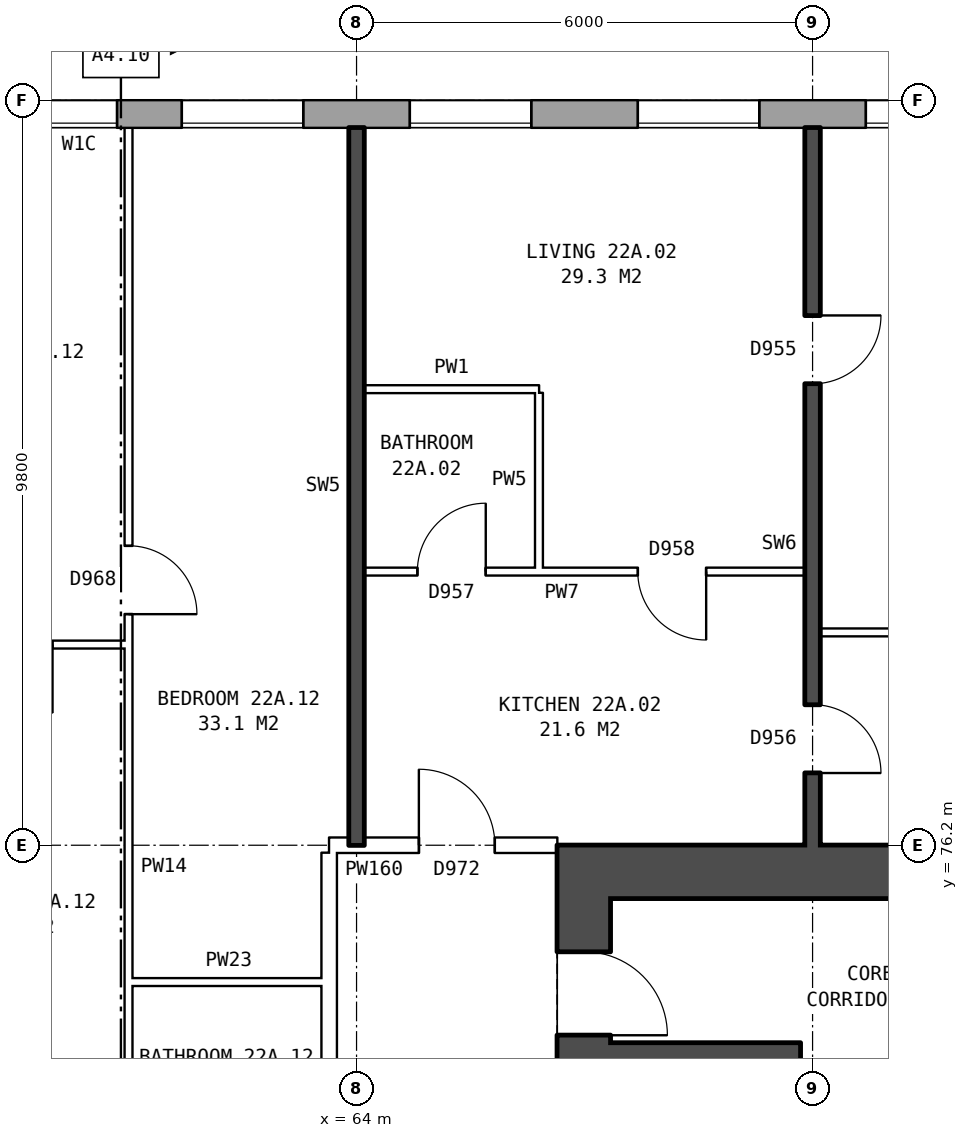
"""IFC4 building model, lengths in metres.
Left out: names, types, materials, properties, quantities, classifications, styles, units other than length and angle.
Written with IfcOpenShell. Run it as: python <this file> out.ifc"""

import sys

from ifc_helpers import new_model, si_unit, direction, frame, frame_2d, origin, place, context, subcontext, project, spatial, rectangle, extrude, element, fill, save


model = new_model("IFC4")
c1 = context("Model", 3, precision=1e-05, world=origin(), true_north=direction((0.0, 1.0)))
c2 = subcontext(c1, "Body", "Model", "MODEL_VIEW")
j1 = project(units=[si_unit("LENGTHUNIT", "METRE"), si_unit("PLANEANGLEUNIT", "RADIAN")], contexts=[c1])
p1 = place(None, origin())
s1 = spatial("IfcSite", under=j1, at=p1, CompositionType="ELEMENT")
p2 = place(p1, origin())
s2 = spatial("IfcBuilding", under=s1, at=p2, CompositionType="ELEMENT")
p3 = place(p2, frame((0.0, 0.0, 80.9)))
s3 = spatial("IfcBuildingStorey", under=s2, at=p3, CompositionType="ELEMENT", Elevation=80.9)
p4 = place(p3, frame((72.925, 85.82, 0.0), z_axis=(0.0, 0.0, 1.0), x_axis=(-1.0, 0.0, 0.0)))
e1 = element("IfcWall", 1, at=p4, inside=s3, PredefinedType="STANDARD", context=c2, shape_type="SweptSolid", body=[
    extrude(rectangle(XDim=46.601, YDim=0.36, at=frame_2d((23.3, 0.0))), origin(), (0.0, 0.0, 1.0), 2.85),
])
p5 = place(p4, frame((0.625, 0.0, 0.8)))
e2 = element("IfcOpeningElement", 2, at=p5, cuts=e1, PredefinedType="OPENING", context=c2, shape_type="SweptSolid", body=[
    extrude(rectangle(XDim=1.6, YDim=1.8, at=frame_2d((0.8, 0.9))), frame((0.0, 0.19, 0.0), z_axis=(0.0, -1.0, 0.0), x_axis=(1.0, 0.0, 0.0)), (0.0, 0.0, 1.0), 0.38),
])
p6 = place(p4, frame((3.625, 0.0, 0.8)))
e3 = element("IfcOpeningElement", 3, at=p6, cuts=e1, PredefinedType="OPENING", context=c2, shape_type="SweptSolid", body=[
    extrude(rectangle(XDim=1.6, YDim=1.8, at=frame_2d((0.8, 0.9))), frame((0.0, 0.19, 0.0), z_axis=(0.0, -1.0, 0.0), x_axis=(1.0, 0.0, 0.0)), (0.0, 0.0, 1.0), 0.38),
])
p7 = place(p4, frame((6.625, 0.0, 0.8)))
e4 = element("IfcOpeningElement", 4, at=p7, cuts=e1, PredefinedType="OPENING", context=c2, shape_type="SweptSolid", body=[
    extrude(rectangle(XDim=1.6, YDim=1.8, at=frame_2d((0.8, 0.9))), frame((0.0, 0.19, 0.0), z_axis=(0.0, -1.0, 0.0), x_axis=(1.0, 0.0, 0.0)), (0.0, 0.0, 1.0), 0.38),
])
p8 = place(p4, frame((9.625, 0.0, 0.8)))
e5 = element("IfcOpeningElement", 5, at=p8, cuts=e1, PredefinedType="OPENING", context=c2, shape_type="SweptSolid", body=[
    extrude(rectangle(XDim=1.6, YDim=1.8, at=frame_2d((0.8, 0.9))), frame((0.0, 0.19, 0.0), z_axis=(0.0, -1.0, 0.0), x_axis=(1.0, 0.0, 0.0)), (0.0, 0.0, 1.0), 0.38),
])
p9 = place(p4, frame((12.075, 0.0, 0.8)))
e6 = element("IfcOpeningElement", 6, at=p9, cuts=e1, PredefinedType="OPENING", context=c2, shape_type="SweptSolid", body=[
    extrude(rectangle(XDim=1.0, YDim=1.8, at=frame_2d((0.5, 0.9))), frame((0.0, 0.19, 0.0), z_axis=(0.0, -1.0, 0.0), x_axis=(1.0, 0.0, 0.0)), (0.0, 0.0, 1.0), 0.38),
])
p10 = place(p4, frame((15.325, 0.0, 0.65)))
e7 = element("IfcOpeningElement", 7, at=p10, cuts=e1, PredefinedType="OPENING", context=c2, shape_type="SweptSolid", body=[
    extrude(rectangle(XDim=0.6, YDim=0.9, at=frame_2d((0.3, 0.45))), frame((0.0, 0.19, 0.0), z_axis=(0.0, -1.0, 0.0), x_axis=(1.0, 0.0, 0.0)), (0.0, 0.0, 1.0), 0.38),
])
p11 = place(p4, frame((18.625, 0.0, 0.8)))
e8 = element("IfcOpeningElement", 8, at=p11, cuts=e1, PredefinedType="OPENING", context=c2, shape_type="SweptSolid", body=[
    extrude(rectangle(XDim=1.6, YDim=1.8, at=frame_2d((0.8, 0.9))), frame((0.0, 0.19, 0.0), z_axis=(0.0, -1.0, 0.0), x_axis=(1.0, 0.0, 0.0)), (0.0, 0.0, 1.0), 0.38),
])
p12 = place(p4, frame((21.625, 0.0, 0.8)))
e9 = element("IfcOpeningElement", 9, at=p12, cuts=e1, PredefinedType="OPENING", context=c2, shape_type="SweptSolid", body=[
    extrude(rectangle(XDim=1.6, YDim=1.8, at=frame_2d((0.8, 0.9))), frame((0.0, 0.19, 0.0), z_axis=(0.0, -1.0, 0.0), x_axis=(1.0, 0.0, 0.0)), (0.0, 0.0, 1.0), 0.38),
])
p13 = place(p4, frame((24.625, 0.0, 0.8)))
e10 = element("IfcOpeningElement", 10, at=p13, cuts=e1, PredefinedType="OPENING", context=c2, shape_type="SweptSolid", body=[
    extrude(rectangle(XDim=1.6, YDim=1.8, at=frame_2d((0.8, 0.9))), frame((0.0, 0.19, 0.0), z_axis=(0.0, -1.0, 0.0), x_axis=(1.0, 0.0, 0.0)), (0.0, 0.0, 1.0), 0.38),
])
p14 = place(p4, frame((27.625, 0.0, 0.8)))
e11 = element("IfcOpeningElement", 11, at=p14, cuts=e1, PredefinedType="OPENING", context=c2, shape_type="SweptSolid", body=[
    extrude(rectangle(XDim=1.6, YDim=1.8, at=frame_2d((0.8, 0.9))), frame((0.0, 0.19, 0.0), z_axis=(0.0, -1.0, 0.0), x_axis=(1.0, 0.0, 0.0)), (0.0, 0.0, 1.0), 0.38),
])
p15 = place(p4, frame((29.525, 0.0, 0.8)))
e12 = element("IfcOpeningElement", 12, at=p15, cuts=e1, PredefinedType="OPENING", context=c2, shape_type="SweptSolid", body=[
    extrude(rectangle(XDim=1.2, YDim=1.2, at=frame_2d((0.6, 0.6))), frame((0.0, 0.19, 0.0), z_axis=(0.0, -1.0, 0.0), x_axis=(1.0, 0.0, 0.0)), (0.0, 0.0, 1.0), 0.38),
])
p16 = place(p4, frame((33.625, 0.0, 0.8)))
e13 = element("IfcOpeningElement", 13, at=p16, cuts=e1, PredefinedType="OPENING", context=c2, shape_type="SweptSolid", body=[
    extrude(rectangle(XDim=1.6, YDim=1.8, at=frame_2d((0.8, 0.9))), frame((0.0, 0.19, 0.0), z_axis=(0.0, -1.0, 0.0), x_axis=(1.0, 0.0, 0.0)), (0.0, 0.0, 1.0), 0.38),
])
p17 = place(p4, frame((36.625, 0.0, 0.8)))
e14 = element("IfcOpeningElement", 14, at=p17, cuts=e1, PredefinedType="OPENING", context=c2, shape_type="SweptSolid", body=[
    extrude(rectangle(XDim=1.6, YDim=1.8, at=frame_2d((0.8, 0.9))), frame((0.0, 0.19, 0.0), z_axis=(0.0, -1.0, 0.0), x_axis=(1.0, 0.0, 0.0)), (0.0, 0.0, 1.0), 0.38),
])
p18 = place(p4, frame((39.625, 0.0, 0.8)))
e15 = element("IfcOpeningElement", 15, at=p18, cuts=e1, PredefinedType="OPENING", context=c2, shape_type="SweptSolid", body=[
    extrude(rectangle(XDim=1.6, YDim=1.8, at=frame_2d((0.8, 0.9))), frame((0.0, 0.19, 0.0), z_axis=(0.0, -1.0, 0.0), x_axis=(1.0, 0.0, 0.0)), (0.0, 0.0, 1.0), 0.38),
])
p19 = place(p4, frame((42.625, 0.0, 0.8)))
e16 = element("IfcOpeningElement", 16, at=p19, cuts=e1, PredefinedType="OPENING", context=c2, shape_type="SweptSolid", body=[
    extrude(rectangle(XDim=1.6, YDim=1.8, at=frame_2d((0.8, 0.9))), frame((0.0, 0.19, 0.0), z_axis=(0.0, -1.0, 0.0), x_axis=(1.0, 0.0, 0.0)), (0.0, 0.0, 1.0), 0.38),
])
p20 = place(p4, frame((13.375, 0.0, 1.7)))
e17 = element("IfcOpeningElement", 17, at=p20, cuts=e1, PredefinedType="OPENING", context=c2, shape_type="SweptSolid", body=[
    extrude(rectangle(XDim=0.8, YDim=0.9, at=frame_2d((0.4, 0.45))), frame((0.0, 0.19, 0.0), z_axis=(0.0, -1.0, 0.0), x_axis=(1.0, 0.0, 0.0)), (0.0, 0.0, 1.0), 0.38),
])
p21 = place(p4, frame((16.375, 0.0, 0.65)))
e18 = element("IfcOpeningElement", 18, at=p21, cuts=e1, PredefinedType="OPENING", context=c2, shape_type="SweptSolid", body=[
    extrude(rectangle(XDim=1.4, YDim=1.8, at=frame_2d((0.7, 0.9))), frame((0.0, 0.19, 0.0), z_axis=(0.0, -1.0, 0.0), x_axis=(1.0, 0.0, 0.0)), (0.0, 0.0, 1.0), 0.38),
])
p22 = place(p3, frame((66.99, 64.5, 0.0), z_axis=(0.0, 0.0, 1.0), x_axis=(0.0, 1.0, 0.0)))
e19 = element("IfcWall", 19, at=p22, inside=s3, PredefinedType="SHEAR", context=c2, shape_type="SweptSolid", body=[
    extrude(rectangle(XDim=11.0, YDim=0.7, at=frame_2d((5.5, 0.0))), origin(), (0.0, 0.0, 1.0), 2.85),
])
p23 = place(p22, frame((0.625, 0.0, 0.0)))
e20 = element("IfcOpeningElement", 20, at=p23, cuts=e19, PredefinedType="OPENING", context=c2, shape_type="SweptSolid", body=[
    extrude(rectangle(XDim=1.1, YDim=2.1, at=frame_2d((0.55, 1.05))), frame((0.0, 0.36, 0.0), z_axis=(0.0, -1.0, 0.0), x_axis=(1.0, 0.0, 0.0)), (0.0, 0.0, 1.0), 0.72),
])
p24 = place(p22, frame((9.2, 0.0, 0.0)))
e21 = element("IfcOpeningElement", 21, at=p24, cuts=e19, PredefinedType="OPENING", context=c2, shape_type="SweptSolid", body=[
    extrude(rectangle(XDim=1.1, YDim=2.1, at=frame_2d((0.55, 1.05))), frame((0.0, 0.36, 0.0), z_axis=(0.0, -1.0, 0.0), x_axis=(1.0, 0.0, 0.0)), (0.0, 0.0, 1.0), 0.72),
])
p25 = place(p3, frame((66.64, 75.85, 0.0), z_axis=(0.0, 0.0, 1.0), x_axis=(1.0, 0.0, 0.0)))
e22 = element("IfcWall", 22, at=p25, inside=s3, PredefinedType="SHEAR", context=c2, shape_type="SweptSolid", body=[
    extrude(rectangle(XDim=9.0, YDim=0.7, at=frame_2d((4.5, 0.0))), origin(), (0.0, 0.0, 1.0), 2.85),
])
p26 = place(p3, frame((67.34, 73.45, 0.0), z_axis=(0.0, 0.0, 1.0), x_axis=(1.0, 0.0, 0.0)))
e23 = element("IfcWall", 23, at=p26, inside=s3, PredefinedType="SHEAR", context=c2, shape_type="SweptSolid", body=[
    extrude(rectangle(XDim=2.2, YDim=0.3, at=frame_2d((1.1, 0.0))), origin(), (0.0, 0.0, 1.0), 2.85),
])
p27 = place(p3, frame((69.69, 67.0, 0.0), z_axis=(0.0, 0.0, 1.0), x_axis=(0.0, 1.0, 0.0)))
e24 = element("IfcWall", 24, at=p27, inside=s3, PredefinedType="SHEAR", context=c2, shape_type="SweptSolid", body=[
    extrude(rectangle(XDim=6.6, YDim=0.3, at=frame_2d((3.3, 0.0))), origin(), (0.0, 0.0, 1.0), 2.85),
])
p28 = place(p3, frame((63.64, 63.9, 0.0), z_axis=(0.0, 0.0, 1.0), x_axis=(0.0, 1.0, 0.0)))
e25 = element("IfcWall", 25, at=p28, inside=s3, PredefinedType="PARTITIONING", context=c2, shape_type="SweptSolid", body=[
    extrude(rectangle(XDim=12.2, YDim=0.2, at=frame_2d((6.1, 0.0))), origin(), (0.0, 0.0, 1.0), 2.85),
])
p29 = place(p28, frame((5.1, 0.0, 0.0)))
e26 = element("IfcOpeningElement", 26, at=p29, cuts=e25, PredefinedType="OPENING", context=c2, shape_type="SweptSolid", body=[
    extrude(rectangle(XDim=2.0, YDim=2.1, at=frame_2d((1.0, 1.05))), frame((0.0, 0.11, 0.0), z_axis=(0.0, -1.0, 0.0), x_axis=(1.0, 0.0, 0.0)), (0.0, 0.0, 1.0), 0.22),
])
p30 = place(p3, frame((61.0, 74.4, 0.0), z_axis=(0.0, 0.0, 1.0), x_axis=(1.0, 0.0, 0.0)))
e27 = element("IfcWall", 27, at=p30, inside=s3, PredefinedType="PARTITIONING", context=c2, shape_type="SweptSolid", body=[
    extrude(rectangle(XDim=2.64, YDim=0.1, at=frame_2d((1.32, 0.0))), origin(), (0.0, 0.0, 1.0), 2.85),
])
p31 = place(p3, frame((63.64, 76.2, 0.0), z_axis=(0.0, 0.0, 1.0), x_axis=(1.0, 0.0, 0.0)))
e28 = element("IfcWall", 28, at=p31, inside=s3, PredefinedType="PARTITIONING", context=c2, shape_type="SweptSolid", body=[
    extrude(rectangle(XDim=3.0, YDim=0.2, at=frame_2d((1.5, 0.0))), origin(), (0.0, 0.0, 1.0), 2.85),
])
p32 = place(p31, frame((1.18, 0.0, 0.0)))
e29 = element("IfcOpeningElement", 29, at=p32, cuts=e28, PredefinedType="OPENING", context=c2, shape_type="SweptSolid", body=[
    extrude(rectangle(XDim=1.0, YDim=2.1, at=frame_2d((0.5, 1.05))), frame((0.0, 0.11, 0.0), z_axis=(0.0, -1.0, 0.0), x_axis=(1.0, 0.0, 0.0)), (0.0, 0.0, 1.0), 0.22),
])
p33 = place(p3, frame((58.1, 78.84, 0.0), z_axis=(0.0, 0.0, 1.0), x_axis=(1.0, 0.0, 0.0)))
e30 = element("IfcWall", 30, at=p33, inside=s3, PredefinedType="PARTITIONING", context=c2, shape_type="SweptSolid", body=[
    extrude(rectangle(XDim=2.9, YDim=0.1, at=frame_2d((1.45, 0.0))), origin(), (0.0, 0.0, 1.0), 2.85),
])
p34 = place(p33, frame((1.0, 0.0, 0.0)))
e31 = element("IfcOpeningElement", 31, at=p34, cuts=e30, PredefinedType="OPENING", context=c2, shape_type="SweptSolid", body=[
    extrude(rectangle(XDim=0.9, YDim=2.1, at=frame_2d((0.45, 1.05))), frame((0.0, 0.06, 0.0), z_axis=(0.0, -1.0, 0.0), x_axis=(1.0, 0.0, 0.0)), (0.0, 0.0, 1.0), 0.12),
])
p35 = place(p3, frame((70.1, 79.0, 0.0), z_axis=(0.0, 0.0, 1.0), x_axis=(1.0, 0.0, 0.0)))
e32 = element("IfcWall", 32, at=p35, inside=s3, PredefinedType="PARTITIONING", context=c2, shape_type="SweptSolid", body=[
    extrude(rectangle(XDim=5.54, YDim=0.1, at=frame_2d((2.77, 0.0))), origin(), (0.0, 0.0, 1.0), 2.85),
])
p36 = place(p3, frame((64.1, 79.8, 0.0), z_axis=(0.0, 0.0, 1.0), x_axis=(1.0, 0.0, 0.0)))
e33 = element("IfcWall", 33, at=p36, inside=s3, PredefinedType="PARTITIONING", context=c2, shape_type="SweptSolid", body=[
    extrude(rectangle(XDim=5.8, YDim=0.1, at=frame_2d((2.9, 0.0))), origin(), (0.0, 0.0, 1.0), 2.85),
])
p37 = place(p36, frame((3.6, 0.0, 0.0)))
e34 = element("IfcOpeningElement", 34, at=p37, cuts=e33, PredefinedType="OPENING", context=c2, shape_type="SweptSolid", body=[
    extrude(rectangle(XDim=0.9, YDim=2.1, at=frame_2d((0.45, 1.05))), frame((0.0, 0.06, 0.0), z_axis=(0.0, -1.0, 0.0), x_axis=(1.0, 0.0, 0.0)), (0.0, 0.0, 1.0), 0.12),
])
p38 = place(p36, frame((0.7, 0.0, 0.0)))
e35 = element("IfcOpeningElement", 35, at=p38, cuts=e33, PredefinedType="OPENING", context=c2, shape_type="SweptSolid", body=[
    extrude(rectangle(XDim=0.9, YDim=2.1, at=frame_2d((0.45, 1.05))), frame((0.0, 0.06, 0.0), z_axis=(0.0, -1.0, 0.0), x_axis=(1.0, 0.0, 0.0)), (0.0, 0.0, 1.0), 0.12),
])
p39 = place(p3, frame((64.1, 82.2, 0.0), z_axis=(0.0, 0.0, 1.0), x_axis=(1.0, 0.0, 0.0)))
e36 = element("IfcWall", 36, at=p39, inside=s3, PredefinedType="PARTITIONING", context=c2, shape_type="SweptSolid", body=[
    extrude(rectangle(XDim=2.3, YDim=0.1, at=frame_2d((1.15, 0.0))), origin(), (0.0, 0.0, 1.0), 2.85),
])
p40 = place(p3, frame((61.0, 71.3, 0.0), z_axis=(0.0, 0.0, 1.0), x_axis=(0.0, 1.0, 0.0)))
e37 = element("IfcWall", 37, at=p40, inside=s3, PredefinedType="PARTITIONING", context=c2, shape_type="SweptSolid", body=[
    extrude(rectangle(XDim=14.34, YDim=0.1, at=frame_2d((7.17, 0.0))), origin(), (0.0, 0.0, 1.0), 2.85),
])
p41 = place(p40, frame((7.94, 0.0, 0.0)))
e38 = element("IfcOpeningElement", 38, at=p41, cuts=e37, PredefinedType="OPENING", context=c2, shape_type="SweptSolid", body=[
    extrude(rectangle(XDim=0.9, YDim=2.1, at=frame_2d((0.45, 1.05))), frame((0.0, 0.06, 0.0), z_axis=(0.0, -1.0, 0.0), x_axis=(1.0, 0.0, 0.0)), (0.0, 0.0, 1.0), 0.12),
])
p42 = place(p40, frame((0.4, 0.0, 0.0)))
e39 = element("IfcOpeningElement", 39, at=p42, cuts=e37, PredefinedType="OPENING", context=c2, shape_type="SweptSolid", body=[
    extrude(rectangle(XDim=0.9, YDim=2.1, at=frame_2d((0.45, 1.05))), frame((0.0, 0.06, 0.0), z_axis=(0.0, -1.0, 0.0), x_axis=(1.0, 0.0, 0.0)), (0.0, 0.0, 1.0), 0.12),
])
p43 = place(p3, frame((64.0, 76.2, 0.0), z_axis=(0.0, 0.0, 1.0), x_axis=(0.0, 1.0, 0.0)))
e40 = element("IfcWall", 40, at=p43, inside=s3, PredefinedType="SOLIDWALL", context=c2, shape_type="SweptSolid", body=[
    extrude(rectangle(XDim=9.44, YDim=0.2, at=frame_2d((4.72, 0.0))), origin(), (0.0, 0.0, 1.0), 2.85),
])
p44 = place(p3, frame((66.4, 79.85, 0.0), z_axis=(0.0, 0.0, 1.0), x_axis=(0.0, 1.0, 0.0)))
e41 = element("IfcWall", 41, at=p44, inside=s3, PredefinedType="PARTITIONING", context=c2, shape_type="SweptSolid", body=[
    extrude(rectangle(XDim=2.3, YDim=0.1, at=frame_2d((1.15, 0.0))), origin(), (0.0, 0.0, 1.0), 2.85),
])
p45 = place(p3, frame((70.0, 76.2, 0.0), z_axis=(0.0, 0.0, 1.0), x_axis=(0.0, 1.0, 0.0)))
e42 = element("IfcWall", 42, at=p45, inside=s3, PredefinedType="SOLIDWALL", context=c2, shape_type="SweptSolid", body=[
    extrude(rectangle(XDim=9.44, YDim=0.2, at=frame_2d((4.72, 0.0))), origin(), (0.0, 0.0, 1.0), 2.85),
])
p46 = place(p45, frame((6.07, 0.0, 0.0)))
e43 = element("IfcOpeningElement", 43, at=p46, cuts=e42, PredefinedType="OPENING", context=c2, shape_type="SweptSolid", body=[
    extrude(rectangle(XDim=0.9, YDim=2.1, at=frame_2d((0.45, 1.05))), frame((0.0, 0.11, 0.0), z_axis=(0.0, -1.0, 0.0), x_axis=(1.0, 0.0, 0.0)), (0.0, 0.0, 1.0), 0.22),
])
p47 = place(p45, frame((0.95, 0.0, 0.0)))
e44 = element("IfcOpeningElement", 44, at=p47, cuts=e42, PredefinedType="OPENING", context=c2, shape_type="SweptSolid", body=[
    extrude(rectangle(XDim=0.9, YDim=2.1, at=frame_2d((0.45, 1.05))), frame((0.0, 0.11, 0.0), z_axis=(0.0, -1.0, 0.0), x_axis=(1.0, 0.0, 0.0)), (0.0, 0.0, 1.0), 0.22),
])
p48 = place(p5, origin())
e45 = element("IfcWindow", 45, at=p48, inside=s3, PartitioningType="SINGLE_PANEL", PredefinedType="WINDOW", context=c2, shape_type="SweptSolid", body=[
    extrude(rectangle(XDim=1.6, YDim=1.8, at=frame_2d((0.8, 0.9))), frame((0.0, 0.15, 0.0), z_axis=(0.0, -1.0, 0.0), x_axis=(1.0, 0.0, 0.0)), (0.0, 0.0, 1.0), 0.06),
])
fill(e2, e45)
p49 = place(p6, origin())
e46 = element("IfcWindow", 46, at=p49, inside=s3, PartitioningType="SINGLE_PANEL", PredefinedType="WINDOW", context=c2, shape_type="SweptSolid", body=[
    extrude(rectangle(XDim=1.6, YDim=1.8, at=frame_2d((0.8, 0.9))), frame((0.0, 0.15, 0.0), z_axis=(0.0, -1.0, 0.0), x_axis=(1.0, 0.0, 0.0)), (0.0, 0.0, 1.0), 0.06),
])
fill(e3, e46)
p50 = place(p7, origin())
e47 = element("IfcWindow", 47, at=p50, inside=s3, PartitioningType="SINGLE_PANEL", PredefinedType="WINDOW", context=c2, shape_type="SweptSolid", body=[
    extrude(rectangle(XDim=1.6, YDim=1.8, at=frame_2d((0.8, 0.9))), frame((0.0, 0.15, 0.0), z_axis=(0.0, -1.0, 0.0), x_axis=(1.0, 0.0, 0.0)), (0.0, 0.0, 1.0), 0.06),
])
fill(e4, e47)
p51 = place(p8, origin())
e48 = element("IfcWindow", 48, at=p51, inside=s3, PartitioningType="SINGLE_PANEL", PredefinedType="WINDOW", context=c2, shape_type="SweptSolid", body=[
    extrude(rectangle(XDim=1.6, YDim=1.8, at=frame_2d((0.8, 0.9))), frame((0.0, 0.15, 0.0), z_axis=(0.0, -1.0, 0.0), x_axis=(1.0, 0.0, 0.0)), (0.0, 0.0, 1.0), 0.06),
])
fill(e5, e48)
p52 = place(p9, origin())
e49 = element("IfcWindow", 49, at=p52, inside=s3, PartitioningType="SINGLE_PANEL", PredefinedType="WINDOW", context=c2, shape_type="SweptSolid", body=[
    extrude(rectangle(XDim=1.0, YDim=1.8, at=frame_2d((0.5, 0.9))), frame((0.0, 0.15, 0.0), z_axis=(0.0, -1.0, 0.0), x_axis=(1.0, 0.0, 0.0)), (0.0, 0.0, 1.0), 0.06),
])
fill(e6, e49)
p53 = place(p24, frame((1.1, 0.0, 0.0), z_axis=(0.0, 0.0, 1.0), x_axis=(-1.0, 0.0, 0.0)))
e50 = element("IfcDoor", 50, at=p53, inside=s3, OperationType="SINGLE_SWING_RIGHT", PredefinedType="DOOR", context=c2, shape_type="SweptSolid", body=[
    extrude(rectangle(XDim=1.1, YDim=2.1, at=frame_2d((0.55, 1.05))), frame((0.0, 0.335, 0.0), z_axis=(0.0, -1.0, 0.0), x_axis=(1.0, 0.0, 0.0)), (0.0, 0.0, 1.0), 0.05),
])
fill(e21, e50)
p54 = place(p46, frame((0.9, 0.0, 0.0), z_axis=(0.0, 0.0, 1.0), x_axis=(-1.0, 0.0, 0.0)))
e51 = element("IfcDoor", 51, at=p54, inside=s3, OperationType="SINGLE_SWING_LEFT", PredefinedType="DOOR", context=c2, shape_type="SweptSolid", body=[
    extrude(rectangle(XDim=0.9, YDim=2.1, at=frame_2d((0.45, 1.05))), frame((0.0, 0.025, 0.0), z_axis=(0.0, -1.0, 0.0), x_axis=(1.0, 0.0, 0.0)), (0.0, 0.0, 1.0), 0.05),
])
fill(e43, e51)
p55 = place(p47, frame((0.9, 0.0, 0.0), z_axis=(0.0, 0.0, 1.0), x_axis=(-1.0, 0.0, 0.0)))
e52 = element("IfcDoor", 52, at=p55, inside=s3, OperationType="SINGLE_SWING_RIGHT", PredefinedType="DOOR", context=c2, shape_type="SweptSolid", body=[
    extrude(rectangle(XDim=0.9, YDim=2.1, at=frame_2d((0.45, 1.05))), frame((0.0, 0.025, 0.0), z_axis=(0.0, -1.0, 0.0), x_axis=(1.0, 0.0, 0.0)), (0.0, 0.0, 1.0), 0.05),
])
fill(e44, e52)
p56 = place(p32, origin())
e53 = element("IfcDoor", 53, at=p56, inside=s3, OperationType="SINGLE_SWING_LEFT", PredefinedType="DOOR", context=c2, shape_type="SweptSolid", body=[
    extrude(rectangle(XDim=1.0, YDim=2.1, at=frame_2d((0.5, 1.05))), frame((0.0, 0.025, 0.0), z_axis=(0.0, -1.0, 0.0), x_axis=(1.0, 0.0, 0.0)), (0.0, 0.0, 1.0), 0.05),
])
fill(e29, e53)
p57 = place(p37, frame((0.9, 0.0, 0.0), z_axis=(0.0, 0.0, 1.0), x_axis=(-1.0, 0.0, 0.0)))
e54 = element("IfcDoor", 54, at=p57, inside=s3, OperationType="SINGLE_SWING_LEFT", PredefinedType="DOOR", context=c2, shape_type="SweptSolid", body=[
    extrude(rectangle(XDim=0.9, YDim=2.1, at=frame_2d((0.45, 1.05))), frame((0.0, 0.025, 0.0), z_axis=(0.0, -1.0, 0.0), x_axis=(1.0, 0.0, 0.0)), (0.0, 0.0, 1.0), 0.05),
])
fill(e34, e54)
p58 = place(p38, origin())
e55 = element("IfcDoor", 55, at=p58, inside=s3, OperationType="SINGLE_SWING_RIGHT", PredefinedType="DOOR", context=c2, shape_type="SweptSolid", body=[
    extrude(rectangle(XDim=0.9, YDim=2.1, at=frame_2d((0.45, 1.05))), frame((0.0, 0.025, 0.0), z_axis=(0.0, -1.0, 0.0), x_axis=(1.0, 0.0, 0.0)), (0.0, 0.0, 1.0), 0.05),
])
fill(e35, e55)
p59 = place(p41, frame((0.9, 0.0, 0.0), z_axis=(0.0, 0.0, 1.0), x_axis=(-1.0, 0.0, 0.0)))
e56 = element("IfcDoor", 56, at=p59, inside=s3, OperationType="SINGLE_SWING_RIGHT", PredefinedType="DOOR", context=c2, shape_type="SweptSolid", body=[
    extrude(rectangle(XDim=0.9, YDim=2.1, at=frame_2d((0.45, 1.05))), frame((0.0, 0.025, 0.0), z_axis=(0.0, -1.0, 0.0), x_axis=(1.0, 0.0, 0.0)), (0.0, 0.0, 1.0), 0.05),
])
fill(e38, e56)
save(model, sys.argv[1])
